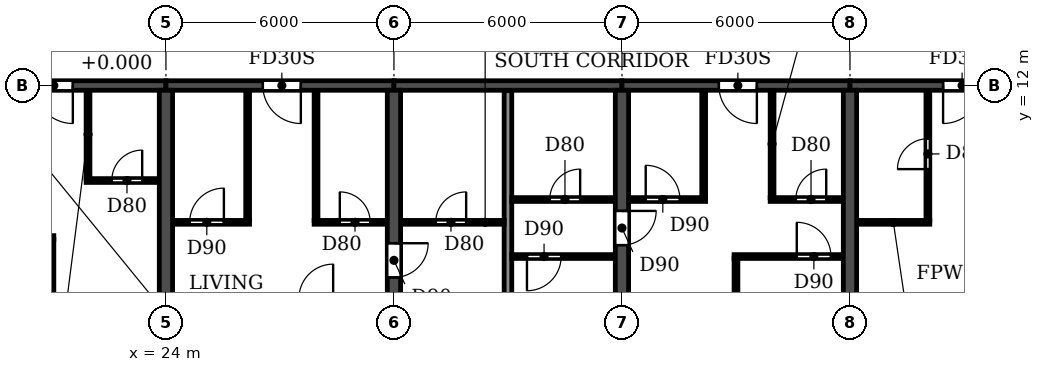
"""IFC4 building model, lengths in metres.
Left out: names, types, materials, properties, quantities, classifications, styles, units other than length and angle.
Written with IfcOpenShell. Run it as: python <this file> out.ifc"""

import sys

from ifc_helpers import new_model, si_unit, direction, frame, frame_2d, origin, place, context, subcontext, project, spatial, rectangle, extrude, element, fill, save


model = new_model("IFC4")
c1 = context("Model", 3, precision=1e-05, world=origin(), true_north=direction((0.0, 1.0)))
c2 = subcontext(c1, "Body", "Model", "MODEL_VIEW")
j1 = project(units=[si_unit("LENGTHUNIT", "METRE"), si_unit("PLANEANGLEUNIT", "RADIAN")], contexts=[c1])
p1 = place(None, origin())
s1 = spatial("IfcSite", under=j1, at=p1, CompositionType="ELEMENT")
p2 = place(p1, origin())
s2 = spatial("IfcBuilding", under=s1, at=p2, CompositionType="ELEMENT")
p3 = place(p2, frame((0.0, 0.0, 82.8)))
s3 = spatial("IfcBuildingStorey", under=s2, at=p3, CompositionType="ELEMENT", Elevation=82.8)
p4 = place(p3, frame((24.0, 0.2, 0.0), z_axis=(0.0, 0.0, 1.0), x_axis=(0.0, 1.0, 0.0)))
e1 = element("IfcWall", 1, at=p4, inside=s3, PredefinedType="SHEAR", context=c2, shape_type="SweptSolid", body=[
    extrude(rectangle(XDim=11.675, YDim=0.35, at=frame_2d((5.837, 0.0))), origin(), (0.0, 0.0, 1.0), 3.06),
])
p5 = place(p3, frame((30.0, 0.2, 0.0), z_axis=(0.0, 0.0, 1.0), x_axis=(0.0, 1.0, 0.0)))
e2 = element("IfcWall", 2, at=p5, inside=s3, PredefinedType="SHEAR", context=c2, shape_type="SweptSolid", body=[
    extrude(rectangle(XDim=11.675, YDim=0.35, at=frame_2d((5.837, 0.0))), origin(), (0.0, 0.0, 1.0), 3.06),
])
p6 = place(p5, frame((6.75, 0.0, 0.0)))
e3 = element("IfcOpeningElement", 3, at=p6, cuts=e2, PredefinedType="OPENING", context=c2, shape_type="SweptSolid", body=[
    extrude(rectangle(XDim=0.9, YDim=2.1, at=frame_2d((0.45, 1.05))), frame((0.0, 0.185, 0.0), z_axis=(0.0, -1.0, 0.0), x_axis=(1.0, 0.0, 0.0)), (0.0, 0.0, 1.0), 0.37),
])
p7 = place(p3, frame((36.0, 0.2, 0.0), z_axis=(0.0, 0.0, 1.0), x_axis=(0.0, 1.0, 0.0)))
e4 = element("IfcWall", 4, at=p7, inside=s3, PredefinedType="SHEAR", context=c2, shape_type="SweptSolid", body=[
    extrude(rectangle(XDim=11.675, YDim=0.35, at=frame_2d((5.837, 0.0))), origin(), (0.0, 0.0, 1.0), 3.06),
])
p8 = place(p7, frame((7.6, 0.0, 0.0)))
e5 = element("IfcOpeningElement", 5, at=p8, cuts=e4, PredefinedType="OPENING", context=c2, shape_type="SweptSolid", body=[
    extrude(rectangle(XDim=0.9, YDim=2.1, at=frame_2d((0.45, 1.05))), frame((0.0, 0.185, 0.0), z_axis=(0.0, -1.0, 0.0), x_axis=(1.0, 0.0, 0.0)), (0.0, 0.0, 1.0), 0.37),
])
p9 = place(p3, frame((42.0, 0.2, 0.0), z_axis=(0.0, 0.0, 1.0), x_axis=(0.0, 1.0, 0.0)))
e6 = element("IfcWall", 6, at=p9, inside=s3, PredefinedType="SHEAR", context=c2, shape_type="SweptSolid", body=[
    extrude(rectangle(XDim=11.675, YDim=0.35, at=frame_2d((5.837, 0.0))), origin(), (0.0, 0.0, 1.0), 3.06),
])
p10 = place(p3, frame((18.0, 12.0, 0.0), z_axis=(0.0, 0.0, 1.0), x_axis=(1.0, 0.0, 0.0)))
e7 = element("IfcWall", 7, at=p10, inside=s3, PredefinedType="SHEAR", context=c2, shape_type="SweptSolid", body=[
    extrude(rectangle(XDim=6.0, YDim=0.25, at=frame_2d((3.0, 0.0))), origin(), (0.0, 0.0, 1.0), 2.46),
])
p11 = place(p10, frame((2.55, 0.0, 0.0)))
e8 = element("IfcOpeningElement", 8, at=p11, cuts=e7, PredefinedType="OPENING", context=c2, shape_type="SweptSolid", body=[
    extrude(rectangle(XDim=1.0, YDim=2.1, at=frame_2d((0.5, 1.05))), frame((0.0, 0.135, 0.0), z_axis=(0.0, -1.0, 0.0), x_axis=(1.0, 0.0, 0.0)), (0.0, 0.0, 1.0), 0.27),
])
p12 = place(p3, frame((24.0, 12.0, 0.0), z_axis=(0.0, 0.0, 1.0), x_axis=(1.0, 0.0, 0.0)))
e9 = element("IfcWall", 9, at=p12, inside=s3, PredefinedType="SHEAR", context=c2, shape_type="SweptSolid", body=[
    extrude(rectangle(XDim=6.0, YDim=0.25, at=frame_2d((3.0, 0.0))), origin(), (0.0, 0.0, 1.0), 2.46),
])
p13 = place(p12, frame((2.55, 0.0, 0.0)))
e10 = element("IfcOpeningElement", 10, at=p13, cuts=e9, PredefinedType="OPENING", context=c2, shape_type="SweptSolid", body=[
    extrude(rectangle(XDim=1.0, YDim=2.1, at=frame_2d((0.5, 1.05))), frame((0.0, 0.135, 0.0), z_axis=(0.0, -1.0, 0.0), x_axis=(1.0, 0.0, 0.0)), (0.0, 0.0, 1.0), 0.27),
])
p14 = place(p3, frame((30.0, 12.0, 0.0), z_axis=(0.0, 0.0, 1.0), x_axis=(1.0, 0.0, 0.0)))
e11 = element("IfcWall", 11, at=p14, inside=s3, PredefinedType="SHEAR", context=c2, shape_type="SweptSolid", body=[
    extrude(rectangle(XDim=6.0, YDim=0.25, at=frame_2d((3.0, 0.0))), origin(), (0.0, 0.0, 1.0), 2.46),
])
p15 = place(p3, frame((36.0, 12.0, 0.0), z_axis=(0.0, 0.0, 1.0), x_axis=(1.0, 0.0, 0.0)))
e12 = element("IfcWall", 12, at=p15, inside=s3, PredefinedType="SHEAR", context=c2, shape_type="SweptSolid", body=[
    extrude(rectangle(XDim=6.0, YDim=0.25, at=frame_2d((3.0, 0.0))), origin(), (0.0, 0.0, 1.0), 2.46),
])
p16 = place(p15, frame((2.55, 0.0, 0.0)))
e13 = element("IfcOpeningElement", 13, at=p16, cuts=e12, PredefinedType="OPENING", context=c2, shape_type="SweptSolid", body=[
    extrude(rectangle(XDim=1.0, YDim=2.1, at=frame_2d((0.5, 1.05))), frame((0.0, 0.135, 0.0), z_axis=(0.0, -1.0, 0.0), x_axis=(1.0, 0.0, 0.0)), (0.0, 0.0, 1.0), 0.27),
])
p17 = place(p3, frame((42.0, 12.0, 0.0), z_axis=(0.0, 0.0, 1.0), x_axis=(1.0, 0.0, 0.0)))
e14 = element("IfcWall", 14, at=p17, inside=s3, PredefinedType="SHEAR", context=c2, shape_type="SweptSolid", body=[
    extrude(rectangle(XDim=6.0, YDim=0.25, at=frame_2d((3.0, 0.0))), origin(), (0.0, 0.0, 1.0), 2.46),
])
p18 = place(p17, frame((2.45, 0.0, 0.0)))
e15 = element("IfcOpeningElement", 15, at=p18, cuts=e14, PredefinedType="OPENING", context=c2, shape_type="SweptSolid", body=[
    extrude(rectangle(XDim=1.0, YDim=2.1, at=frame_2d((0.5, 1.05))), frame((0.0, 0.135, 0.0), z_axis=(0.0, -1.0, 0.0), x_axis=(1.0, 0.0, 0.0)), (0.0, 0.0, 1.0), 0.27),
])
p19 = place(p3, frame((33.0, 0.06, 0.0), z_axis=(0.0, 0.0, 1.0), x_axis=(0.0, 1.0, 0.0)))
e16 = element("IfcWall", 16, at=p19, inside=s3, PredefinedType="PARTITIONING", context=c2, shape_type="SweptSolid", body=[
    extrude(rectangle(XDim=11.805, YDim=0.2, at=frame_2d((5.902, 0.0))), origin(), (0.0, 0.0, 1.0), 3.06),
])
p20 = place(p3, frame((33.1, 7.5, 0.0), z_axis=(0.0, 0.0, 1.0), x_axis=(1.0, 0.0, 0.0)))
e17 = element("IfcWall", 17, at=p20, inside=s3, PredefinedType="PARTITIONING", context=c2, shape_type="SweptSolid", body=[
    extrude(rectangle(XDim=2.715, YDim=0.1, at=frame_2d((1.357, 0.0))), origin(), (0.0, 0.0, 1.0), 3.06),
])
p21 = place(p20, frame((0.4, 0.0, 0.0)))
e18 = element("IfcOpeningElement", 18, at=p21, cuts=e17, PredefinedType="OPENING", context=c2, shape_type="SweptSolid", body=[
    extrude(rectangle(XDim=0.9, YDim=2.1, at=frame_2d((0.45, 1.05))), frame((0.0, 0.06, 0.0), z_axis=(0.0, -1.0, 0.0), x_axis=(1.0, 0.0, 0.0)), (0.0, 0.0, 1.0), 0.12),
])
p22 = place(p3, frame((38.95, 7.5, 0.0), z_axis=(0.0, 0.0, 1.0), x_axis=(1.0, 0.0, 0.0)))
e19 = element("IfcWall", 19, at=p22, inside=s3, PredefinedType="PARTITIONING", context=c2, shape_type="SweptSolid", body=[
    extrude(rectangle(XDim=2.865, YDim=0.1, at=frame_2d((1.433, 0.0))), origin(), (0.0, 0.0, 1.0), 3.06),
])
p23 = place(p22, frame((1.65, 0.0, 0.0)))
e20 = element("IfcOpeningElement", 20, at=p23, cuts=e19, PredefinedType="OPENING", context=c2, shape_type="SweptSolid", body=[
    extrude(rectangle(XDim=0.9, YDim=2.1, at=frame_2d((0.45, 1.05))), frame((0.0, 0.06, 0.0), z_axis=(0.0, -1.0, 0.0), x_axis=(1.0, 0.0, 0.0)), (0.0, 0.0, 1.0), 0.12),
])
p24 = place(p3, frame((18.185, 8.0, 0.0), z_axis=(0.0, 0.0, 1.0), x_axis=(1.0, 0.0, 0.0)))
e21 = element("IfcWall", 21, at=p24, inside=s3, PredefinedType="PARTITIONING", context=c2, shape_type="SweptSolid", body=[
    extrude(rectangle(XDim=2.865, YDim=0.1, at=frame_2d((1.433, 0.0))), origin(), (0.0, 0.0, 1.0), 3.06),
])
p25 = place(p24, frame((0.315, 0.0, 0.0)))
e22 = element("IfcOpeningElement", 22, at=p25, cuts=e21, PredefinedType="OPENING", context=c2, shape_type="SweptSolid", body=[
    extrude(rectangle(XDim=0.9, YDim=2.1, at=frame_2d((0.45, 1.05))), frame((0.0, 0.06, 0.0), z_axis=(0.0, -1.0, 0.0), x_axis=(1.0, 0.0, 0.0)), (0.0, 0.0, 1.0), 0.12),
])
p26 = place(p3, frame((24.185, 8.4, 0.0), z_axis=(0.0, 0.0, 1.0), x_axis=(1.0, 0.0, 0.0)))
e23 = element("IfcWall", 23, at=p26, inside=s3, PredefinedType="PARTITIONING", context=c2, shape_type="SweptSolid", body=[
    extrude(rectangle(XDim=2.015, YDim=0.1, at=frame_2d((1.007, 0.0))), origin(), (0.0, 0.0, 1.0), 3.06),
])
p27 = place(p26, frame((0.44, 0.0, 0.0)))
e24 = element("IfcOpeningElement", 24, at=p27, cuts=e23, PredefinedType="OPENING", context=c2, shape_type="SweptSolid", body=[
    extrude(rectangle(XDim=0.9, YDim=2.1, at=frame_2d((0.45, 1.05))), frame((0.0, 0.06, 0.0), z_axis=(0.0, -1.0, 0.0), x_axis=(1.0, 0.0, 0.0)), (0.0, 0.0, 1.0), 0.12),
])
p28 = place(p3, frame((27.9, 8.4, 0.0), z_axis=(0.0, 0.0, 1.0), x_axis=(1.0, 0.0, 0.0)))
e25 = element("IfcWall", 25, at=p28, inside=s3, PredefinedType="PARTITIONING", context=c2, shape_type="SweptSolid", body=[
    extrude(rectangle(XDim=1.915, YDim=0.1, at=frame_2d((0.958, 0.0))), origin(), (0.0, 0.0, 1.0), 3.06),
])
p29 = place(p28, frame((0.675, 0.0, 0.0)))
e26 = element("IfcOpeningElement", 26, at=p29, cuts=e25, PredefinedType="OPENING", context=c2, shape_type="SweptSolid", body=[
    extrude(rectangle(XDim=0.8, YDim=2.1, at=frame_2d((0.4, 1.05))), frame((0.0, 0.06, 0.0), z_axis=(0.0, -1.0, 0.0), x_axis=(1.0, 0.0, 0.0)), (0.0, 0.0, 1.0), 0.12),
])
p30 = place(p3, frame((30.185, 8.4, 0.0), z_axis=(0.0, 0.0, 1.0), x_axis=(1.0, 0.0, 0.0)))
e27 = element("IfcWall", 27, at=p30, inside=s3, PredefinedType="PARTITIONING", context=c2, shape_type="SweptSolid", body=[
    extrude(rectangle(XDim=2.715, YDim=0.1, at=frame_2d((1.357, 0.0))), origin(), (0.0, 0.0, 1.0), 3.06),
])
p31 = place(p30, frame((0.915, 0.0, 0.0)))
e28 = element("IfcOpeningElement", 28, at=p31, cuts=e27, PredefinedType="OPENING", context=c2, shape_type="SweptSolid", body=[
    extrude(rectangle(XDim=0.8, YDim=2.1, at=frame_2d((0.4, 1.05))), frame((0.0, 0.06, 0.0), z_axis=(0.0, -1.0, 0.0), x_axis=(1.0, 0.0, 0.0)), (0.0, 0.0, 1.0), 0.12),
])
p32 = place(p3, frame((42.185, 8.4, 0.0), z_axis=(0.0, 0.0, 1.0), x_axis=(1.0, 0.0, 0.0)))
e29 = element("IfcWall", 29, at=p32, inside=s3, PredefinedType="PARTITIONING", context=c2, shape_type="SweptSolid", body=[
    extrude(rectangle(XDim=1.915, YDim=0.1, at=frame_2d((0.958, 0.0))), origin(), (0.0, 0.0, 1.0), 3.06),
])
p33 = place(p3, frame((33.1, 9.0, 0.0), z_axis=(0.0, 0.0, 1.0), x_axis=(1.0, 0.0, 0.0)))
e30 = element("IfcWall", 30, at=p33, inside=s3, PredefinedType="PARTITIONING", context=c2, shape_type="SweptSolid", body=[
    extrude(rectangle(XDim=2.715, YDim=0.1, at=frame_2d((1.357, 0.0))), origin(), (0.0, 0.0, 1.0), 3.06),
])
p34 = place(p33, frame((1.0, 0.0, 0.0)))
e31 = element("IfcOpeningElement", 31, at=p34, cuts=e30, PredefinedType="OPENING", context=c2, shape_type="SweptSolid", body=[
    extrude(rectangle(XDim=0.8, YDim=2.1, at=frame_2d((0.4, 1.05))), frame((0.0, 0.06, 0.0), z_axis=(0.0, -1.0, 0.0), x_axis=(1.0, 0.0, 0.0)), (0.0, 0.0, 1.0), 0.12),
])
p35 = place(p3, frame((36.185, 9.0, 0.0), z_axis=(0.0, 0.0, 1.0), x_axis=(1.0, 0.0, 0.0)))
e32 = element("IfcWall", 32, at=p35, inside=s3, PredefinedType="PARTITIONING", context=c2, shape_type="SweptSolid", body=[
    extrude(rectangle(XDim=2.015, YDim=0.1, at=frame_2d((1.007, 0.0))), origin(), (0.0, 0.0, 1.0), 3.06),
])
p36 = place(p35, frame((0.44, 0.0, 0.0)))
e33 = element("IfcOpeningElement", 33, at=p36, cuts=e32, PredefinedType="OPENING", context=c2, shape_type="SweptSolid", body=[
    extrude(rectangle(XDim=0.9, YDim=2.1, at=frame_2d((0.45, 1.05))), frame((0.0, 0.06, 0.0), z_axis=(0.0, -1.0, 0.0), x_axis=(1.0, 0.0, 0.0)), (0.0, 0.0, 1.0), 0.12),
])
p37 = place(p3, frame((39.9, 9.0, 0.0), z_axis=(0.0, 0.0, 1.0), x_axis=(1.0, 0.0, 0.0)))
e34 = element("IfcWall", 34, at=p37, inside=s3, PredefinedType="PARTITIONING", context=c2, shape_type="SweptSolid", body=[
    extrude(rectangle(XDim=1.915, YDim=0.1, at=frame_2d((0.958, 0.0))), origin(), (0.0, 0.0, 1.0), 3.06),
])
p38 = place(p37, frame((0.675, 0.0, 0.0)))
e35 = element("IfcOpeningElement", 35, at=p38, cuts=e34, PredefinedType="OPENING", context=c2, shape_type="SweptSolid", body=[
    extrude(rectangle(XDim=0.8, YDim=2.1, at=frame_2d((0.4, 1.05))), frame((0.0, 0.06, 0.0), z_axis=(0.0, -1.0, 0.0), x_axis=(1.0, 0.0, 0.0)), (0.0, 0.0, 1.0), 0.12),
])
p39 = place(p3, frame((21.9, 9.5, 0.0), z_axis=(0.0, 0.0, 1.0), x_axis=(1.0, 0.0, 0.0)))
e36 = element("IfcWall", 36, at=p39, inside=s3, PredefinedType="PARTITIONING", context=c2, shape_type="SweptSolid", body=[
    extrude(rectangle(XDim=1.915, YDim=0.1, at=frame_2d((0.958, 0.0))), origin(), (0.0, 0.0, 1.0), 3.06),
])
p40 = place(p39, frame((0.675, 0.0, 0.0)))
e37 = element("IfcOpeningElement", 37, at=p40, cuts=e36, PredefinedType="OPENING", context=c2, shape_type="SweptSolid", body=[
    extrude(rectangle(XDim=0.8, YDim=2.1, at=frame_2d((0.4, 1.05))), frame((0.0, 0.06, 0.0), z_axis=(0.0, -1.0, 0.0), x_axis=(1.0, 0.0, 0.0)), (0.0, 0.0, 1.0), 0.12),
])
p41 = place(p3, frame((21.0, 0.06, 0.0), z_axis=(0.0, 0.0, 1.0), x_axis=(0.0, 1.0, 0.0)))
e38 = element("IfcWall", 38, at=p41, inside=s3, PredefinedType="PARTITIONING", context=c2, shape_type="SweptSolid", body=[
    extrude(rectangle(XDim=7.89, YDim=0.1, at=frame_2d((3.945, 0.0))), origin(), (0.0, 0.0, 1.0), 3.06),
])
p42 = place(p3, frame((21.95, 9.55, 0.0), z_axis=(0.0, 0.0, 1.0), x_axis=(0.0, 1.0, 0.0)))
e39 = element("IfcWall", 39, at=p42, inside=s3, PredefinedType="PARTITIONING", context=c2, shape_type="SweptSolid", body=[
    extrude(rectangle(XDim=2.315, YDim=0.1, at=frame_2d((1.157, 0.0))), origin(), (0.0, 0.0, 1.0), 3.06),
])
for number, where, z_axis, x_axis in (
    (40, (26.15, 8.45, 0.0), (0.0, 0.0, 1.0), (0.0, 1.0, 0.0)),
    (41, (27.95, 8.45, 0.0), (0.0, 0.0, 1.0), (0.0, 1.0, 0.0)),
):
    element("IfcWall", number, at=place(p3, frame(where, z_axis=z_axis, x_axis=x_axis)), inside=s3, PredefinedType="PARTITIONING", context=c2, shape_type="SweptSolid", body=[
        extrude(rectangle(XDim=3.415, YDim=0.1, at=frame_2d((1.708, 0.0))), origin(), (0.0, 0.0, 1.0), 3.06),
    ])
p43 = place(p3, frame((38.15, 9.05, 0.0), z_axis=(0.0, 0.0, 1.0), x_axis=(0.0, 1.0, 0.0)))
e42 = element("IfcWall", 42, at=p43, inside=s3, PredefinedType="PARTITIONING", context=c2, shape_type="SweptSolid", body=[
    extrude(rectangle(XDim=2.815, YDim=0.1, at=frame_2d((1.407, 0.0))), origin(), (0.0, 0.0, 1.0), 3.06),
])
p44 = place(p3, frame((39.0, 0.06, 0.0), z_axis=(0.0, 0.0, 1.0), x_axis=(0.0, 1.0, 0.0)))
e43 = element("IfcWall", 43, at=p44, inside=s3, PredefinedType="PARTITIONING", context=c2, shape_type="SweptSolid", body=[
    extrude(rectangle(XDim=7.39, YDim=0.1, at=frame_2d((3.695, 0.0))), origin(), (0.0, 0.0, 1.0), 3.06),
])
p45 = place(p3, frame((39.95, 9.05, 0.0), z_axis=(0.0, 0.0, 1.0), x_axis=(0.0, 1.0, 0.0)))
e44 = element("IfcWall", 44, at=p45, inside=s3, PredefinedType="PARTITIONING", context=c2, shape_type="SweptSolid", body=[
    extrude(rectangle(XDim=2.815, YDim=0.1, at=frame_2d((1.407, 0.0))), origin(), (0.0, 0.0, 1.0), 3.06),
])
p46 = place(p3, frame((44.05, 8.45, 0.0), z_axis=(0.0, 0.0, 1.0), x_axis=(0.0, 1.0, 0.0)))
e45 = element("IfcWall", 45, at=p46, inside=s3, PredefinedType="PARTITIONING", context=c2, shape_type="SweptSolid", body=[
    extrude(rectangle(XDim=3.415, YDim=0.1, at=frame_2d((1.708, 0.0))), origin(), (0.0, 0.0, 1.0), 3.06),
])
p47 = place(p46, frame((1.35, 0.0, 0.0)))
e46 = element("IfcOpeningElement", 46, at=p47, cuts=e45, PredefinedType="OPENING", context=c2, shape_type="SweptSolid", body=[
    extrude(rectangle(XDim=0.8, YDim=2.1, at=frame_2d((0.4, 1.05))), frame((0.0, 0.06, 0.0), z_axis=(0.0, -1.0, 0.0), x_axis=(1.0, 0.0, 0.0)), (0.0, 0.0, 1.0), 0.12),
])
p48 = place(p11, frame((1.0, 0.0, 0.0), z_axis=(0.0, 0.0, 1.0), x_axis=(-1.0, 0.0, 0.0)))
e47 = element("IfcDoor", 47, at=p48, inside=s3, OperationType="SINGLE_SWING_LEFT", PredefinedType="DOOR", context=c2, shape_type="SweptSolid", body=[
    extrude(rectangle(XDim=1.0, YDim=2.1, at=frame_2d((0.5, 1.05))), frame((0.0, 0.025, 0.0), z_axis=(0.0, -1.0, 0.0), x_axis=(1.0, 0.0, 0.0)), (0.0, 0.0, 1.0), 0.05),
])
fill(e8, e47)
p49 = place(p40, origin())
e48 = element("IfcDoor", 48, at=p49, inside=s3, OperationType="SINGLE_SWING_RIGHT", PredefinedType="DOOR", context=c2, shape_type="SweptSolid", body=[
    extrude(rectangle(XDim=0.8, YDim=2.1, at=frame_2d((0.4, 1.05))), frame((0.0, 0.025, 0.0), z_axis=(0.0, -1.0, 0.0), x_axis=(1.0, 0.0, 0.0)), (0.0, 0.0, 1.0), 0.05),
])
fill(e37, e48)
p50 = place(p31, origin())
e49 = element("IfcDoor", 49, at=p50, inside=s3, OperationType="SINGLE_SWING_RIGHT", PredefinedType="DOOR", context=c2, shape_type="SweptSolid", body=[
    extrude(rectangle(XDim=0.8, YDim=2.1, at=frame_2d((0.4, 1.05))), frame((0.0, 0.025, 0.0), z_axis=(0.0, -1.0, 0.0), x_axis=(1.0, 0.0, 0.0)), (0.0, 0.0, 1.0), 0.05),
])
fill(e28, e49)
p51 = place(p27, origin())
e50 = element("IfcDoor", 50, at=p51, inside=s3, OperationType="SINGLE_SWING_RIGHT", PredefinedType="DOOR", context=c2, shape_type="SweptSolid", body=[
    extrude(rectangle(XDim=0.9, YDim=2.1, at=frame_2d((0.45, 1.05))), frame((0.0, 0.025, 0.0), z_axis=(0.0, -1.0, 0.0), x_axis=(1.0, 0.0, 0.0)), (0.0, 0.0, 1.0), 0.05),
])
fill(e24, e50)
p52 = place(p13, frame((1.0, 0.0, 0.0), z_axis=(0.0, 0.0, 1.0), x_axis=(-1.0, 0.0, 0.0)))
e51 = element("IfcDoor", 51, at=p52, inside=s3, OperationType="SINGLE_SWING_LEFT", PredefinedType="DOOR", context=c2, shape_type="SweptSolid", body=[
    extrude(rectangle(XDim=1.0, YDim=2.1, at=frame_2d((0.5, 1.05))), frame((0.0, 0.025, 0.0), z_axis=(0.0, -1.0, 0.0), x_axis=(1.0, 0.0, 0.0)), (0.0, 0.0, 1.0), 0.05),
])
fill(e10, e51)
p53 = place(p29, origin())
e52 = element("IfcDoor", 52, at=p53, inside=s3, OperationType="SINGLE_SWING_LEFT", PredefinedType="DOOR", context=c2, shape_type="SweptSolid", body=[
    extrude(rectangle(XDim=0.8, YDim=2.1, at=frame_2d((0.4, 1.05))), frame((0.0, 0.025, 0.0), z_axis=(0.0, -1.0, 0.0), x_axis=(1.0, 0.0, 0.0)), (0.0, 0.0, 1.0), 0.05),
])
fill(e26, e52)
p54 = place(p6, frame((0.9, 0.0, 0.0), z_axis=(0.0, 0.0, 1.0), x_axis=(-1.0, 0.0, 0.0)))
e53 = element("IfcDoor", 53, at=p54, inside=s3, OperationType="SINGLE_SWING_LEFT", PredefinedType="DOOR", context=c2, shape_type="SweptSolid", body=[
    extrude(rectangle(XDim=0.9, YDim=2.1, at=frame_2d((0.45, 1.05))), frame((0.0, 0.025, 0.0), z_axis=(0.0, -1.0, 0.0), x_axis=(1.0, 0.0, 0.0)), (0.0, 0.0, 1.0), 0.05),
])
fill(e3, e53)
p55 = place(p21, frame((0.9, 0.0, 0.0), z_axis=(0.0, 0.0, 1.0), x_axis=(-1.0, 0.0, 0.0)))
e54 = element("IfcDoor", 54, at=p55, inside=s3, OperationType="SINGLE_SWING_RIGHT", PredefinedType="DOOR", context=c2, shape_type="SweptSolid", body=[
    extrude(rectangle(XDim=0.9, YDim=2.1, at=frame_2d((0.45, 1.05))), frame((0.0, 0.025, 0.0), z_axis=(0.0, -1.0, 0.0), x_axis=(1.0, 0.0, 0.0)), (0.0, 0.0, 1.0), 0.05),
])
fill(e18, e54)
p56 = place(p34, origin())
e55 = element("IfcDoor", 55, at=p56, inside=s3, OperationType="SINGLE_SWING_RIGHT", PredefinedType="DOOR", context=c2, shape_type="SweptSolid", body=[
    extrude(rectangle(XDim=0.8, YDim=2.1, at=frame_2d((0.4, 1.05))), frame((0.0, 0.025, 0.0), z_axis=(0.0, -1.0, 0.0), x_axis=(1.0, 0.0, 0.0)), (0.0, 0.0, 1.0), 0.05),
])
fill(e31, e55)
p57 = place(p8, frame((0.9, 0.0, 0.0), z_axis=(0.0, 0.0, 1.0), x_axis=(-1.0, 0.0, 0.0)))
e56 = element("IfcDoor", 56, at=p57, inside=s3, OperationType="SINGLE_SWING_LEFT", PredefinedType="DOOR", context=c2, shape_type="SweptSolid", body=[
    extrude(rectangle(XDim=0.9, YDim=2.1, at=frame_2d((0.45, 1.05))), frame((0.0, 0.025, 0.0), z_axis=(0.0, -1.0, 0.0), x_axis=(1.0, 0.0, 0.0)), (0.0, 0.0, 1.0), 0.05),
])
fill(e5, e56)
p58 = place(p36, origin())
e57 = element("IfcDoor", 57, at=p58, inside=s3, OperationType="SINGLE_SWING_LEFT", PredefinedType="DOOR", context=c2, shape_type="SweptSolid", body=[
    extrude(rectangle(XDim=0.9, YDim=2.1, at=frame_2d((0.45, 1.05))), frame((0.0, 0.025, 0.0), z_axis=(0.0, -1.0, 0.0), x_axis=(1.0, 0.0, 0.0)), (0.0, 0.0, 1.0), 0.05),
])
fill(e33, e57)
p59 = place(p16, frame((1.0, 0.0, 0.0), z_axis=(0.0, 0.0, 1.0), x_axis=(-1.0, 0.0, 0.0)))
e58 = element("IfcDoor", 58, at=p59, inside=s3, OperationType="SINGLE_SWING_LEFT", PredefinedType="DOOR", context=c2, shape_type="SweptSolid", body=[
    extrude(rectangle(XDim=1.0, YDim=2.1, at=frame_2d((0.5, 1.05))), frame((0.0, 0.025, 0.0), z_axis=(0.0, -1.0, 0.0), x_axis=(1.0, 0.0, 0.0)), (0.0, 0.0, 1.0), 0.05),
])
fill(e13, e58)
p60 = place(p38, origin())
e59 = element("IfcDoor", 59, at=p60, inside=s3, OperationType="SINGLE_SWING_RIGHT", PredefinedType="DOOR", context=c2, shape_type="SweptSolid", body=[
    extrude(rectangle(XDim=0.8, YDim=2.1, at=frame_2d((0.4, 1.05))), frame((0.0, 0.025, 0.0), z_axis=(0.0, -1.0, 0.0), x_axis=(1.0, 0.0, 0.0)), (0.0, 0.0, 1.0), 0.05),
])
fill(e35, e59)
p61 = place(p23, origin())
e60 = element("IfcDoor", 60, at=p61, inside=s3, OperationType="SINGLE_SWING_LEFT", PredefinedType="DOOR", context=c2, shape_type="SweptSolid", body=[
    extrude(rectangle(XDim=0.9, YDim=2.1, at=frame_2d((0.45, 1.05))), frame((0.0, 0.025, 0.0), z_axis=(0.0, -1.0, 0.0), x_axis=(1.0, 0.0, 0.0)), (0.0, 0.0, 1.0), 0.05),
])
fill(e20, e60)
p62 = place(p47, origin())
e61 = element("IfcDoor", 61, at=p62, inside=s3, OperationType="SINGLE_SWING_LEFT", PredefinedType="DOOR", context=c2, shape_type="SweptSolid", body=[
    extrude(rectangle(XDim=0.8, YDim=2.1, at=frame_2d((0.4, 1.05))), frame((0.0, 0.025, 0.0), z_axis=(0.0, -1.0, 0.0), x_axis=(1.0, 0.0, 0.0)), (0.0, 0.0, 1.0), 0.05),
])
fill(e46, e61)
p63 = place(p18, frame((1.0, 0.0, 0.0), z_axis=(0.0, 0.0, 1.0), x_axis=(-1.0, 0.0, 0.0)))
e62 = element("IfcDoor", 62, at=p63, inside=s3, OperationType="SINGLE_SWING_RIGHT", PredefinedType="DOOR", context=c2, shape_type="SweptSolid", body=[
    extrude(rectangle(XDim=1.0, YDim=2.1, at=frame_2d((0.5, 1.05))), frame((0.0, 0.025, 0.0), z_axis=(0.0, -1.0, 0.0), x_axis=(1.0, 0.0, 0.0)), (0.0, 0.0, 1.0), 0.05),
])
fill(e15, e62)
save(model, sys.argv[1])
